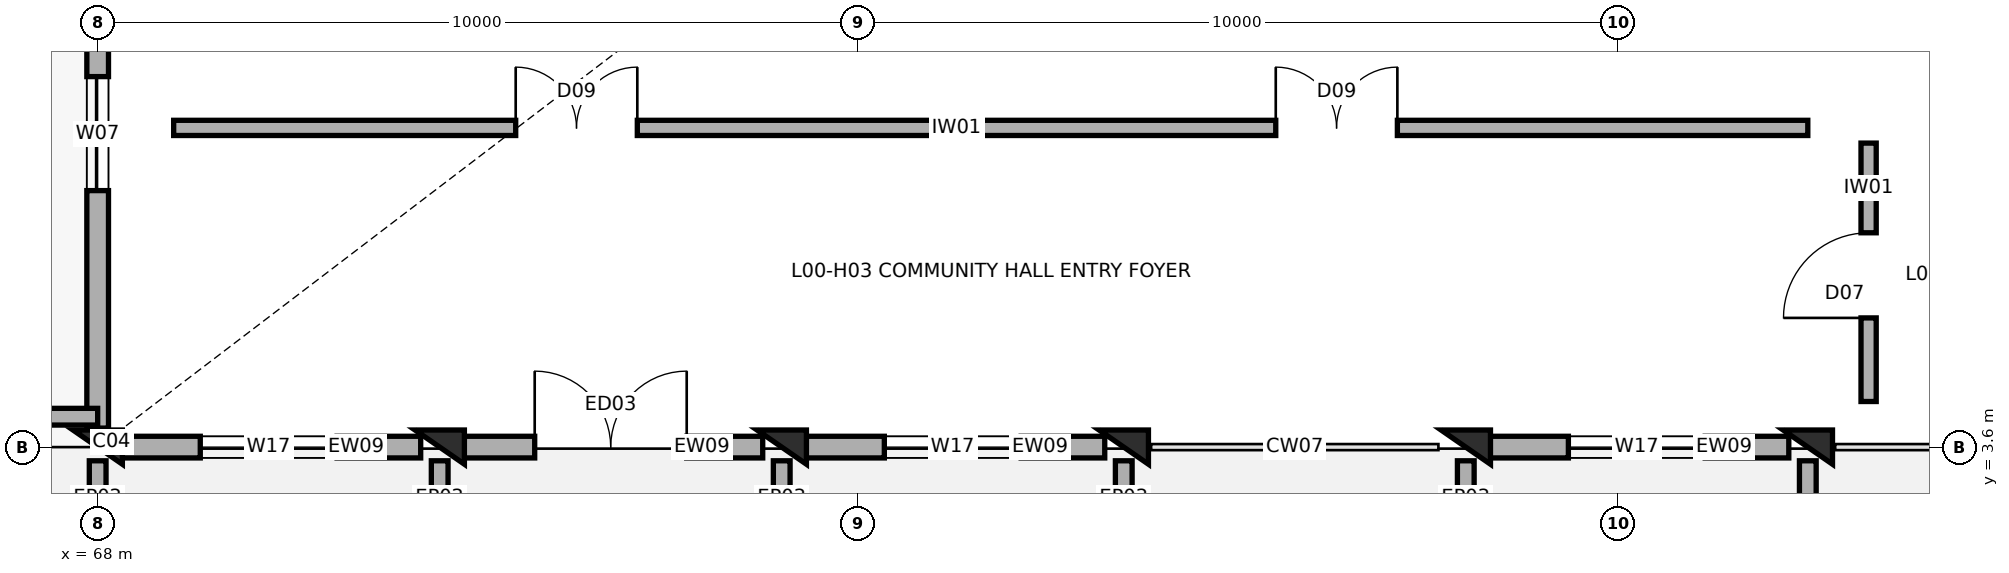
"""IFC4 building model, lengths in metres.
Left out: names, types, materials, properties, quantities, classifications, styles, units other than length and angle.
Written with IfcOpenShell. Run it as: python <this file> out.ifc"""

import sys

from ifc_helpers import new_model, si_unit, direction, frame, frame_2d, origin, origin_2d, place, context, subcontext, project, spatial, rectangle, extrude, element, fill, save


model = new_model("IFC4")
c1 = context("Model", 3, precision=1e-05, world=origin(), true_north=direction((0.0, 1.0)))
c2 = subcontext(c1, "Body", "Model", "MODEL_VIEW")
j1 = project(units=[si_unit("LENGTHUNIT", "METRE"), si_unit("PLANEANGLEUNIT", "RADIAN")], contexts=[c1])
p1 = place(None, origin())
s1 = spatial("IfcSite", under=j1, at=p1, CompositionType="ELEMENT")
p2 = place(p1, origin())
s2 = spatial("IfcBuilding", under=s1, at=p2, CompositionType="ELEMENT")
p3 = place(p2, origin())
s3 = spatial("IfcBuildingStorey", under=s2, at=p3, CompositionType="ELEMENT", Elevation=0.0)
for number, where, z_axis, x_axis in (
    (1, (68.0, 3.6, 0.0), (0.0, 0.0, 1.0), (0.0, 1.0, 0.0)),
    (2, (72.5, 3.6, 0.0), (0.0, 0.0, 1.0), (0.0, 1.0, 0.0)),
    (3, (77.0, 3.6, 0.0), (0.0, 0.0, 1.0), (0.0, 1.0, 0.0)),
    (4, (81.5, 3.6, 0.0), (0.0, 0.0, 1.0), (0.0, 1.0, 0.0)),
    (5, (86.0, 3.6, 0.0), (0.0, 0.0, 1.0), (0.0, 1.0, 0.0)),
    (6, (90.5, 3.6, 0.0), (0.0, 0.0, 1.0), (0.0, 1.0, 0.0)),
):
    element("IfcColumn", number, at=place(p3, frame(where, z_axis=z_axis, x_axis=x_axis)), inside=s3, PredefinedType="COLUMN", context=c2, shape_type="SweptSolid", body=[
        extrude(rectangle(XDim=0.45, YDim=0.65, at=origin_2d()), origin(), (0.0, 0.0, 1.0), 4.5),
    ])
p4 = place(p3, frame((68.25, 3.6, 0.0), z_axis=(0.0, 0.0, 1.0), x_axis=(1.0, 0.0, 0.0)))
e7 = element("IfcWall", 7, at=p4, inside=s3, PredefinedType="SOLIDWALL", context=c2, shape_type="SweptSolid", body=[
    extrude(rectangle(XDim=4.0, YDim=0.285, at=frame_2d((2.0, 0.0))), origin(), (0.0, 0.0, 1.0), 3.5),
])
p5 = place(p4, frame((1.1, 0.0, 0.45)))
e8 = element("IfcOpeningElement", 8, at=p5, cuts=e7, PredefinedType="OPENING", context=c2, shape_type="SweptSolid", body=[
    extrude(rectangle(XDim=1.8, YDim=2.1, at=frame_2d((0.9, 1.05))), frame((0.0, 0.152, 0.0), z_axis=(0.0, -1.0, 0.0), x_axis=(1.0, 0.0, 0.0)), (0.0, 0.0, 1.0), 0.305),
])
p6 = place(p3, frame((72.75, 3.6, 0.0), z_axis=(0.0, 0.0, 1.0), x_axis=(1.0, 0.0, 0.0)))
e9 = element("IfcWall", 9, at=p6, inside=s3, PredefinedType="SOLIDWALL", context=c2, shape_type="SweptSolid", body=[
    extrude(rectangle(XDim=4.0, YDim=0.285, at=frame_2d((2.0, 0.0))), origin(), (0.0, 0.0, 1.0), 3.5),
])
p7 = place(p6, frame((1.0, 0.0, 0.0)))
e10 = element("IfcOpeningElement", 10, at=p7, cuts=e9, PredefinedType="OPENING", context=c2, shape_type="SweptSolid", body=[
    extrude(rectangle(XDim=2.0, YDim=2.4, at=frame_2d((1.0, 1.2))), frame((0.0, 0.152, 0.0), z_axis=(0.0, -1.0, 0.0), x_axis=(1.0, 0.0, 0.0)), (0.0, 0.0, 1.0), 0.305),
])
p8 = place(p3, frame((77.25, 3.6, 0.0), z_axis=(0.0, 0.0, 1.0), x_axis=(1.0, 0.0, 0.0)))
e11 = element("IfcWall", 11, at=p8, inside=s3, PredefinedType="SOLIDWALL", context=c2, shape_type="SweptSolid", body=[
    extrude(rectangle(XDim=4.0, YDim=0.285, at=frame_2d((2.0, 0.0))), origin(), (0.0, 0.0, 1.0), 3.5),
])
p9 = place(p8, frame((1.1, 0.0, 0.45)))
e12 = element("IfcOpeningElement", 12, at=p9, cuts=e11, PredefinedType="OPENING", context=c2, shape_type="SweptSolid", body=[
    extrude(rectangle(XDim=1.8, YDim=2.1, at=frame_2d((0.9, 1.05))), frame((0.0, 0.152, 0.0), z_axis=(0.0, -1.0, 0.0), x_axis=(1.0, 0.0, 0.0)), (0.0, 0.0, 1.0), 0.305),
])
p10 = place(p3, frame((86.25, 3.6, 0.0), z_axis=(0.0, 0.0, 1.0), x_axis=(1.0, 0.0, 0.0)))
e13 = element("IfcWall", 13, at=p10, inside=s3, PredefinedType="SOLIDWALL", context=c2, shape_type="SweptSolid", body=[
    extrude(rectangle(XDim=4.0, YDim=0.285, at=frame_2d((2.0, 0.0))), origin(), (0.0, 0.0, 1.0), 3.5),
])
p11 = place(p10, frame((1.1, 0.0, 0.45)))
e14 = element("IfcOpeningElement", 14, at=p11, cuts=e13, PredefinedType="OPENING", context=c2, shape_type="SweptSolid", body=[
    extrude(rectangle(XDim=1.8, YDim=2.1, at=frame_2d((0.9, 1.05))), frame((0.0, 0.152, 0.0), z_axis=(0.0, -1.0, 0.0), x_axis=(1.0, 0.0, 0.0)), (0.0, 0.0, 1.0), 0.305),
])
p12 = place(p3, frame((68.0, 3.85, 0.0), z_axis=(0.0, 0.0, 1.0), x_axis=(0.0, 1.0, 0.0)))
e15 = element("IfcWall", 15, at=p12, inside=s3, PredefinedType="SOLIDWALL", context=c2, shape_type="SweptSolid", body=[
    extrude(rectangle(XDim=7.75, YDim=0.285, at=frame_2d((3.875, 0.0))), origin(), (0.0, 0.0, 1.0), 3.5),
])
p13 = place(p12, frame((3.125, 0.0, 0.45)))
e16 = element("IfcOpeningElement", 16, at=p13, cuts=e15, PredefinedType="OPENING", context=c2, shape_type="SweptSolid", body=[
    extrude(rectangle(XDim=1.5, YDim=1.65, at=frame_2d((0.75, 0.825))), frame((0.0, 0.152, 0.0), z_axis=(0.0, -1.0, 0.0), x_axis=(1.0, 0.0, 0.0)), (0.0, 0.0, 1.0), 0.305),
])
for number, where, z_axis, x_axis in (
    (17, (68.0, 2.55, 0.0), (0.0, 0.0, 1.0), (0.0, 1.0, 0.0)),
    (18, (72.5, 2.55, 0.0), (0.0, 0.0, 1.0), (0.0, 1.0, 0.0)),
    (19, (77.0, 2.55, 0.0), (0.0, 0.0, 1.0), (0.0, 1.0, 0.0)),
    (20, (81.5, 2.55, 0.0), (0.0, 0.0, 1.0), (0.0, 1.0, 0.0)),
    (21, (86.0, 2.55, 0.0), (0.0, 0.0, 1.0), (0.0, 1.0, 0.0)),
    (22, (90.5, 2.55, 0.0), (0.0, 0.0, 1.0), (0.0, 1.0, 0.0)),
):
    element("IfcWall", number, at=place(p3, frame(where, z_axis=z_axis, x_axis=x_axis)), inside=s3, PredefinedType="PARAPET", context=c2, shape_type="SweptSolid", body=[
        extrude(rectangle(XDim=0.87, YDim=0.22, at=frame_2d((0.435, 0.0))), origin(), (0.0, 0.0, 1.0), 4.5),
    ])
p14 = place(p3, frame((58.0, 4.0, 0.0), z_axis=(0.0, 0.0, 1.0), x_axis=(1.0, 0.0, 0.0)))
e23 = element("IfcWall", 23, at=p14, inside=s3, PredefinedType="SOLIDWALL", context=c2, shape_type="SweptSolid", body=[
    extrude(rectangle(XDim=10.0, YDim=0.22, at=frame_2d((5.0, 0.0))), origin(), (0.0, 0.0, 1.0), 3.1),
])
p15 = place(p14, frame((3.8, 0.0, 0.0)))
e24 = element("IfcOpeningElement", 24, at=p15, cuts=e23, PredefinedType="OPENING", context=c2, shape_type="SweptSolid", body=[
    extrude(rectangle(XDim=2.4, YDim=2.2, at=frame_2d((1.2, 1.1))), frame((0.0, 0.12, 0.0), z_axis=(0.0, -1.0, 0.0), x_axis=(1.0, 0.0, 0.0)), (0.0, 0.0, 1.0), 0.24),
])
p16 = place(p3, frame((69.0, 7.8, 0.0), z_axis=(0.0, 0.0, 1.0), x_axis=(1.0, 0.0, 0.0)))
e25 = element("IfcWall", 25, at=p16, inside=s3, PredefinedType="SOLIDWALL", context=c2, shape_type="SweptSolid", body=[
    extrude(rectangle(XDim=21.5, YDim=0.2, at=frame_2d((10.75, 0.0))), origin(), (0.0, 0.0, 1.0), 3.4),
])
p17 = place(p16, frame((4.5, 0.0, 0.0)))
e26 = element("IfcOpeningElement", 26, at=p17, cuts=e25, PredefinedType="OPENING", context=c2, shape_type="SweptSolid", body=[
    extrude(rectangle(XDim=1.6, YDim=2.25, at=frame_2d((0.8, 1.125))), frame((0.0, 0.11, 0.0), z_axis=(0.0, -1.0, 0.0), x_axis=(1.0, 0.0, 0.0)), (0.0, 0.0, 1.0), 0.22),
])
p18 = place(p16, frame((14.5, 0.0, 0.0)))
e27 = element("IfcOpeningElement", 27, at=p18, cuts=e25, PredefinedType="OPENING", context=c2, shape_type="SweptSolid", body=[
    extrude(rectangle(XDim=1.6, YDim=2.25, at=frame_2d((0.8, 1.125))), frame((0.0, 0.11, 0.0), z_axis=(0.0, -1.0, 0.0), x_axis=(1.0, 0.0, 0.0)), (0.0, 0.0, 1.0), 0.22),
])
p19 = place(p3, frame((91.3, 4.2, 0.0), z_axis=(0.0, 0.0, 1.0), x_axis=(0.0, 1.0, 0.0)))
e28 = element("IfcWall", 28, at=p19, inside=s3, PredefinedType="SOLIDWALL", context=c2, shape_type="SweptSolid", body=[
    extrude(rectangle(XDim=3.4, YDim=0.2, at=frame_2d((1.7, 0.0))), origin(), (0.0, 0.0, 1.0), 3.4),
])
p20 = place(p19, frame((1.1, 0.0, 0.0)))
e29 = element("IfcOpeningElement", 29, at=p20, cuts=e28, PredefinedType="OPENING", context=c2, shape_type="SweptSolid", body=[
    extrude(rectangle(XDim=1.12, YDim=2.15, at=frame_2d((0.56, 1.075))), frame((0.0, 0.11, 0.0), z_axis=(0.0, -1.0, 0.0), x_axis=(1.0, 0.0, 0.0)), (0.0, 0.0, 1.0), 0.22),
])
p21 = place(p5, origin())
e30 = element("IfcWindow", 30, at=p21, inside=s3, PartitioningType="DOUBLE_PANEL_HORIZONTAL", PredefinedType="WINDOW", context=c2, shape_type="SweptSolid", body=[
    extrude(rectangle(XDim=1.8, YDim=2.1, at=frame_2d((0.9, 1.05))), frame((0.0, 0.03, 0.0), z_axis=(0.0, -1.0, 0.0), x_axis=(1.0, 0.0, 0.0)), (0.0, 0.0, 1.0), 0.06),
])
fill(e8, e30)
p22 = place(p7, origin())
e31 = element("IfcDoor", 31, at=p22, inside=s3, OperationType="DOUBLE_DOOR_SINGLE_SWING", PredefinedType="DOOR", context=c2, shape_type="SweptSolid", body=[
    extrude(rectangle(XDim=2.0, YDim=2.4, at=frame_2d((1.0, 1.2))), frame((0.0, 0.025, 0.0), z_axis=(0.0, -1.0, 0.0), x_axis=(1.0, 0.0, 0.0)), (0.0, 0.0, 1.0), 0.05),
])
fill(e10, e31)
p23 = place(p9, origin())
e32 = element("IfcWindow", 32, at=p23, inside=s3, PartitioningType="DOUBLE_PANEL_HORIZONTAL", PredefinedType="WINDOW", context=c2, shape_type="SweptSolid", body=[
    extrude(rectangle(XDim=1.8, YDim=2.1, at=frame_2d((0.9, 1.05))), frame((0.0, 0.03, 0.0), z_axis=(0.0, -1.0, 0.0), x_axis=(1.0, 0.0, 0.0)), (0.0, 0.0, 1.0), 0.06),
])
fill(e12, e32)
p24 = place(p11, origin())
e33 = element("IfcWindow", 33, at=p24, inside=s3, PartitioningType="DOUBLE_PANEL_HORIZONTAL", PredefinedType="WINDOW", context=c2, shape_type="SweptSolid", body=[
    extrude(rectangle(XDim=1.8, YDim=2.1, at=frame_2d((0.9, 1.05))), frame((0.0, 0.03, 0.0), z_axis=(0.0, -1.0, 0.0), x_axis=(1.0, 0.0, 0.0)), (0.0, 0.0, 1.0), 0.06),
])
fill(e14, e33)
p25 = place(p13, origin())
e34 = element("IfcWindow", 34, at=p25, inside=s3, PartitioningType="DOUBLE_PANEL_VERTICAL", PredefinedType="WINDOW", context=c2, shape_type="SweptSolid", body=[
    extrude(rectangle(XDim=1.5, YDim=1.65, at=frame_2d((0.75, 0.825))), frame((0.0, 0.03, 0.0), z_axis=(0.0, -1.0, 0.0), x_axis=(1.0, 0.0, 0.0)), (0.0, 0.0, 1.0), 0.06),
])
fill(e16, e34)
p26 = place(p17, origin())
e35 = element("IfcDoor", 35, at=p26, inside=s3, OperationType="DOUBLE_DOOR_SINGLE_SWING", PredefinedType="DOOR", context=c2, shape_type="SweptSolid", body=[
    extrude(rectangle(XDim=1.6, YDim=2.25, at=frame_2d((0.8, 1.125))), frame((0.0, 0.025, 0.0), z_axis=(0.0, -1.0, 0.0), x_axis=(1.0, 0.0, 0.0)), (0.0, 0.0, 1.0), 0.05),
])
fill(e26, e35)
p27 = place(p18, origin())
e36 = element("IfcDoor", 36, at=p27, inside=s3, OperationType="DOUBLE_DOOR_SINGLE_SWING", PredefinedType="DOOR", context=c2, shape_type="SweptSolid", body=[
    extrude(rectangle(XDim=1.6, YDim=2.25, at=frame_2d((0.8, 1.125))), frame((0.0, 0.025, 0.0), z_axis=(0.0, -1.0, 0.0), x_axis=(1.0, 0.0, 0.0)), (0.0, 0.0, 1.0), 0.05),
])
fill(e27, e36)
p28 = place(p20, origin())
e37 = element("IfcDoor", 37, at=p28, inside=s3, OperationType="SINGLE_SWING_LEFT", PredefinedType="DOOR", context=c2, shape_type="SweptSolid", body=[
    extrude(rectangle(XDim=1.12, YDim=2.15, at=frame_2d((0.56, 1.075))), frame((0.0, 0.025, 0.0), z_axis=(0.0, -1.0, 0.0), x_axis=(1.0, 0.0, 0.0)), (0.0, 0.0, 1.0), 0.05),
])
fill(e29, e37)
save(model, sys.argv[1])
